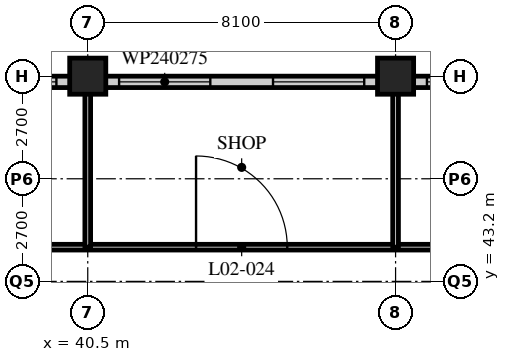
"""IFC4 building model, lengths in metres.
Left out: names, types, materials, properties, quantities, classifications, styles, units other than length and angle.
Written with IfcOpenShell. Run it as: python <this file> out.ifc"""

import sys

from ifc_helpers import new_model, si_unit, direction, frame, frame_2d, origin, origin_2d, place, context, subcontext, project, spatial, rectangle, hollow_rectangle, extrude, element, fill, save


model = new_model("IFC4")
c1 = context("Model", 3, precision=1e-05, world=origin(), true_north=direction((0.0, 1.0)))
c2 = subcontext(c1, "Body", "Model", "MODEL_VIEW")
j1 = project(units=[si_unit("LENGTHUNIT", "METRE"), si_unit("PLANEANGLEUNIT", "RADIAN")], contexts=[c1])
p1 = place(None, origin())
s1 = spatial("IfcSite", under=j1, at=p1, CompositionType="ELEMENT")
p2 = place(p1, origin())
s2 = spatial("IfcBuilding", under=s1, at=p2, CompositionType="ELEMENT")
p3 = place(p2, frame((0.0, 0.0, 11.4)))
s3 = spatial("IfcBuildingStorey", under=s2, at=p3, CompositionType="ELEMENT", Elevation=11.4)
for number, where, z_axis, x_axis in (
    (1, (40.5, 48.6, 0.0), (0.0, 0.0, 1.0), (1.0, 0.0, 0.0)),
    (2, (48.6, 48.6, 0.0), (0.0, 0.0, 1.0), (1.0, 0.0, 0.0)),
):
    element("IfcColumn", number, at=place(p3, frame(where, z_axis=z_axis, x_axis=x_axis)), inside=s3, PredefinedType="COLUMN", context=c2, shape_type="SweptSolid", body=[
        extrude(hollow_rectangle(XDim=0.95, YDim=0.95, WallThickness=0.1, at=origin_2d()), origin(), (0.0, 0.0, 1.0), 5.4),
    ])
p4 = place(p3, frame((64.5, 48.45, 0.0), z_axis=(0.0, 0.0, 1.0), x_axis=(-1.0, 0.0, 0.0)))
e3 = element("IfcWall", 3, at=p4, inside=s3, PredefinedType="SOLIDWALL", context=c2, shape_type="SweptSolid", body=[
    extrude(rectangle(XDim=72.6, YDim=0.3, at=frame_2d((36.3, 0.0))), origin(), (0.0, 0.0, 1.0), 5.15),
])
p5 = place(p4, frame((0.525, 0.0, 1.0)))
e4 = element("IfcOpeningElement", 4, at=p5, cuts=e3, PredefinedType="OPENING", context=c2, shape_type="SweptSolid", body=[
    extrude(rectangle(XDim=2.4, YDim=2.75, at=frame_2d((1.2, 1.375))), frame((0.0, 0.16, 0.0), z_axis=(0.0, -1.0, 0.0), x_axis=(1.0, 0.0, 0.0)), (0.0, 0.0, 1.0), 0.32),
])
p6 = place(p4, frame((4.575, 0.0, 1.0)))
e5 = element("IfcOpeningElement", 5, at=p6, cuts=e3, PredefinedType="OPENING", context=c2, shape_type="SweptSolid", body=[
    extrude(rectangle(XDim=2.4, YDim=2.75, at=frame_2d((1.2, 1.375))), frame((0.0, 0.16, 0.0), z_axis=(0.0, -1.0, 0.0), x_axis=(1.0, 0.0, 0.0)), (0.0, 0.0, 1.0), 0.32),
])
p7 = place(p4, frame((8.625, 0.0, 1.0)))
e6 = element("IfcOpeningElement", 6, at=p7, cuts=e3, PredefinedType="OPENING", context=c2, shape_type="SweptSolid", body=[
    extrude(rectangle(XDim=2.4, YDim=2.75, at=frame_2d((1.2, 1.375))), frame((0.0, 0.16, 0.0), z_axis=(0.0, -1.0, 0.0), x_axis=(1.0, 0.0, 0.0)), (0.0, 0.0, 1.0), 0.32),
])
p8 = place(p4, frame((12.675, 0.0, 1.0)))
e7 = element("IfcOpeningElement", 7, at=p8, cuts=e3, PredefinedType="OPENING", context=c2, shape_type="SweptSolid", body=[
    extrude(rectangle(XDim=2.4, YDim=2.75, at=frame_2d((1.2, 1.375))), frame((0.0, 0.16, 0.0), z_axis=(0.0, -1.0, 0.0), x_axis=(1.0, 0.0, 0.0)), (0.0, 0.0, 1.0), 0.32),
])
p9 = place(p4, frame((16.725, 0.0, 1.0)))
e8 = element("IfcOpeningElement", 8, at=p9, cuts=e3, PredefinedType="OPENING", context=c2, shape_type="SweptSolid", body=[
    extrude(rectangle(XDim=2.4, YDim=2.75, at=frame_2d((1.2, 1.375))), frame((0.0, 0.16, 0.0), z_axis=(0.0, -1.0, 0.0), x_axis=(1.0, 0.0, 0.0)), (0.0, 0.0, 1.0), 0.32),
])
p10 = place(p4, frame((20.775, 0.0, 1.0)))
e9 = element("IfcOpeningElement", 9, at=p10, cuts=e3, PredefinedType="OPENING", context=c2, shape_type="SweptSolid", body=[
    extrude(rectangle(XDim=2.4, YDim=2.75, at=frame_2d((1.2, 1.375))), frame((0.0, 0.16, 0.0), z_axis=(0.0, -1.0, 0.0), x_axis=(1.0, 0.0, 0.0)), (0.0, 0.0, 1.0), 0.32),
])
p11 = place(p4, frame((24.825, 0.0, 1.0)))
e10 = element("IfcOpeningElement", 10, at=p11, cuts=e3, PredefinedType="OPENING", context=c2, shape_type="SweptSolid", body=[
    extrude(rectangle(XDim=2.4, YDim=2.75, at=frame_2d((1.2, 1.375))), frame((0.0, 0.16, 0.0), z_axis=(0.0, -1.0, 0.0), x_axis=(1.0, 0.0, 0.0)), (0.0, 0.0, 1.0), 0.32),
])
p12 = place(p4, frame((28.875, 0.0, 1.0)))
e11 = element("IfcOpeningElement", 11, at=p12, cuts=e3, PredefinedType="OPENING", context=c2, shape_type="SweptSolid", body=[
    extrude(rectangle(XDim=2.4, YDim=2.75, at=frame_2d((1.2, 1.375))), frame((0.0, 0.16, 0.0), z_axis=(0.0, -1.0, 0.0), x_axis=(1.0, 0.0, 0.0)), (0.0, 0.0, 1.0), 0.32),
])
p13 = place(p4, frame((32.925, 0.0, 1.0)))
e12 = element("IfcOpeningElement", 12, at=p13, cuts=e3, PredefinedType="OPENING", context=c2, shape_type="SweptSolid", body=[
    extrude(rectangle(XDim=2.4, YDim=2.75, at=frame_2d((1.2, 1.375))), frame((0.0, 0.16, 0.0), z_axis=(0.0, -1.0, 0.0), x_axis=(1.0, 0.0, 0.0)), (0.0, 0.0, 1.0), 0.32),
])
p14 = place(p4, frame((36.975, 0.0, 1.0)))
e13 = element("IfcOpeningElement", 13, at=p14, cuts=e3, PredefinedType="OPENING", context=c2, shape_type="SweptSolid", body=[
    extrude(rectangle(XDim=2.4, YDim=2.75, at=frame_2d((1.2, 1.375))), frame((0.0, 0.16, 0.0), z_axis=(0.0, -1.0, 0.0), x_axis=(1.0, 0.0, 0.0)), (0.0, 0.0, 1.0), 0.32),
])
p15 = place(p4, frame((41.025, 0.0, 1.0)))
e14 = element("IfcOpeningElement", 14, at=p15, cuts=e3, PredefinedType="OPENING", context=c2, shape_type="SweptSolid", body=[
    extrude(rectangle(XDim=2.4, YDim=2.75, at=frame_2d((1.2, 1.375))), frame((0.0, 0.16, 0.0), z_axis=(0.0, -1.0, 0.0), x_axis=(1.0, 0.0, 0.0)), (0.0, 0.0, 1.0), 0.32),
])
p16 = place(p4, frame((45.075, 0.0, 1.0)))
e15 = element("IfcOpeningElement", 15, at=p16, cuts=e3, PredefinedType="OPENING", context=c2, shape_type="SweptSolid", body=[
    extrude(rectangle(XDim=2.4, YDim=2.75, at=frame_2d((1.2, 1.375))), frame((0.0, 0.16, 0.0), z_axis=(0.0, -1.0, 0.0), x_axis=(1.0, 0.0, 0.0)), (0.0, 0.0, 1.0), 0.32),
])
p17 = place(p4, frame((49.125, 0.0, 1.0)))
e16 = element("IfcOpeningElement", 16, at=p17, cuts=e3, PredefinedType="OPENING", context=c2, shape_type="SweptSolid", body=[
    extrude(rectangle(XDim=2.4, YDim=2.75, at=frame_2d((1.2, 1.375))), frame((0.0, 0.16, 0.0), z_axis=(0.0, -1.0, 0.0), x_axis=(1.0, 0.0, 0.0)), (0.0, 0.0, 1.0), 0.32),
])
p18 = place(p4, frame((53.175, 0.0, 1.0)))
e17 = element("IfcOpeningElement", 17, at=p18, cuts=e3, PredefinedType="OPENING", context=c2, shape_type="SweptSolid", body=[
    extrude(rectangle(XDim=2.4, YDim=2.75, at=frame_2d((1.2, 1.375))), frame((0.0, 0.16, 0.0), z_axis=(0.0, -1.0, 0.0), x_axis=(1.0, 0.0, 0.0)), (0.0, 0.0, 1.0), 0.32),
])
p19 = place(p4, frame((57.225, 0.0, 1.0)))
e18 = element("IfcOpeningElement", 18, at=p19, cuts=e3, PredefinedType="OPENING", context=c2, shape_type="SweptSolid", body=[
    extrude(rectangle(XDim=2.4, YDim=2.75, at=frame_2d((1.2, 1.375))), frame((0.0, 0.16, 0.0), z_axis=(0.0, -1.0, 0.0), x_axis=(1.0, 0.0, 0.0)), (0.0, 0.0, 1.0), 0.32),
])
p20 = place(p4, frame((61.275, 0.0, 1.0)))
e19 = element("IfcOpeningElement", 19, at=p20, cuts=e3, PredefinedType="OPENING", context=c2, shape_type="SweptSolid", body=[
    extrude(rectangle(XDim=2.4, YDim=2.75, at=frame_2d((1.2, 1.375))), frame((0.0, 0.16, 0.0), z_axis=(0.0, -1.0, 0.0), x_axis=(1.0, 0.0, 0.0)), (0.0, 0.0, 1.0), 0.32),
])
p21 = place(p4, frame((65.325, 0.0, 1.0)))
e20 = element("IfcOpeningElement", 20, at=p21, cuts=e3, PredefinedType="OPENING", context=c2, shape_type="SweptSolid", body=[
    extrude(rectangle(XDim=2.4, YDim=2.75, at=frame_2d((1.2, 1.375))), frame((0.0, 0.16, 0.0), z_axis=(0.0, -1.0, 0.0), x_axis=(1.0, 0.0, 0.0)), (0.0, 0.0, 1.0), 0.32),
])
p22 = place(p4, frame((69.375, 0.0, 1.0)))
e21 = element("IfcOpeningElement", 21, at=p22, cuts=e3, PredefinedType="OPENING", context=c2, shape_type="SweptSolid", body=[
    extrude(rectangle(XDim=2.4, YDim=2.75, at=frame_2d((1.2, 1.375))), frame((0.0, 0.16, 0.0), z_axis=(0.0, -1.0, 0.0), x_axis=(1.0, 0.0, 0.0)), (0.0, 0.0, 1.0), 0.32),
])
p23 = place(p3, frame((0.0, 44.1, 0.0), z_axis=(0.0, 0.0, 1.0), x_axis=(1.0, 0.0, 0.0)))
e22 = element("IfcWall", 22, at=p23, inside=s3, PredefinedType="PARTITIONING", context=c2, shape_type="SweptSolid", body=[
    extrude(rectangle(XDim=56.7, YDim=0.15, at=frame_2d((28.35, 0.0))), origin(), (0.0, 0.0, 1.0), 5.15),
])
p24 = place(p23, frame((10.95, 0.0, 0.0)))
e23 = element("IfcOpeningElement", 23, at=p24, cuts=e22, PredefinedType="OPENING", context=c2, shape_type="SweptSolid", body=[
    extrude(rectangle(XDim=2.4, YDim=2.7, at=frame_2d((1.2, 1.35))), frame((0.0, 0.085, 0.0), z_axis=(0.0, -1.0, 0.0), x_axis=(1.0, 0.0, 0.0)), (0.0, 0.0, 1.0), 0.17),
])
p25 = place(p23, frame((19.05, 0.0, 0.0)))
e24 = element("IfcOpeningElement", 24, at=p25, cuts=e22, PredefinedType="OPENING", context=c2, shape_type="SweptSolid", body=[
    extrude(rectangle(XDim=2.4, YDim=2.7, at=frame_2d((1.2, 1.35))), frame((0.0, 0.085, 0.0), z_axis=(0.0, -1.0, 0.0), x_axis=(1.0, 0.0, 0.0)), (0.0, 0.0, 1.0), 0.17),
])
p26 = place(p23, frame((27.15, 0.0, 0.0)))
e25 = element("IfcOpeningElement", 25, at=p26, cuts=e22, PredefinedType="OPENING", context=c2, shape_type="SweptSolid", body=[
    extrude(rectangle(XDim=2.4, YDim=2.7, at=frame_2d((1.2, 1.35))), frame((0.0, 0.085, 0.0), z_axis=(0.0, -1.0, 0.0), x_axis=(1.0, 0.0, 0.0)), (0.0, 0.0, 1.0), 0.17),
])
p27 = place(p23, frame((35.25, 0.0, 0.0)))
e26 = element("IfcOpeningElement", 26, at=p27, cuts=e22, PredefinedType="OPENING", context=c2, shape_type="SweptSolid", body=[
    extrude(rectangle(XDim=2.4, YDim=2.7, at=frame_2d((1.2, 1.35))), frame((0.0, 0.085, 0.0), z_axis=(0.0, -1.0, 0.0), x_axis=(1.0, 0.0, 0.0)), (0.0, 0.0, 1.0), 0.17),
])
p28 = place(p23, frame((43.35, 0.0, 0.0)))
e27 = element("IfcOpeningElement", 27, at=p28, cuts=e22, PredefinedType="OPENING", context=c2, shape_type="SweptSolid", body=[
    extrude(rectangle(XDim=2.4, YDim=2.7, at=frame_2d((1.2, 1.35))), frame((0.0, 0.085, 0.0), z_axis=(0.0, -1.0, 0.0), x_axis=(1.0, 0.0, 0.0)), (0.0, 0.0, 1.0), 0.17),
])
p29 = place(p23, frame((53.45, 0.0, 0.0)))
e28 = element("IfcOpeningElement", 28, at=p29, cuts=e22, PredefinedType="OPENING", context=c2, shape_type="SweptSolid", body=[
    extrude(rectangle(XDim=2.4, YDim=2.7, at=frame_2d((1.2, 1.35))), frame((0.0, 0.085, 0.0), z_axis=(0.0, -1.0, 0.0), x_axis=(1.0, 0.0, 0.0)), (0.0, 0.0, 1.0), 0.17),
])
p30 = place(p23, frame((4.85, 0.0, 0.0)))
e29 = element("IfcOpeningElement", 29, at=p30, cuts=e22, PredefinedType="OPENING", context=c2, shape_type="SweptSolid", body=[
    extrude(rectangle(XDim=2.4, YDim=2.7, at=frame_2d((1.2, 1.35))), frame((0.0, 0.085, 0.0), z_axis=(0.0, -1.0, 0.0), x_axis=(1.0, 0.0, 0.0)), (0.0, 0.0, 1.0), 0.17),
])
for number, where, z_axis, x_axis in (
    (30, (40.5, 44.1, 0.0), (0.0, 0.0, 1.0), (0.0, 1.0, 0.0)),
    (31, (48.6, 44.1, 0.0), (0.0, 0.0, 1.0), (0.0, 1.0, 0.0)),
):
    element("IfcWall", number, at=place(p3, frame(where, z_axis=z_axis, x_axis=x_axis)), inside=s3, PredefinedType="PARTITIONING", context=c2, shape_type="SweptSolid", body=[
        extrude(rectangle(XDim=4.2, YDim=0.15, at=frame_2d((2.1, 0.0))), origin(), (0.0, 0.0, 1.0), 4.538),
    ])
p31 = place(p8, origin())
e32 = element("IfcWindow", 32, at=p31, inside=s3, PartitioningType="SINGLE_PANEL", PredefinedType="WINDOW", context=c2, shape_type="SweptSolid", body=[
    extrude(rectangle(XDim=2.4, YDim=2.75, at=frame_2d((1.2, 1.375))), frame((0.0, 0.03, 0.0), z_axis=(0.0, -1.0, 0.0), x_axis=(1.0, 0.0, 0.0)), (0.0, 0.0, 1.0), 0.06),
])
fill(e7, e32)
p32 = place(p9, origin())
e33 = element("IfcWindow", 33, at=p32, inside=s3, PartitioningType="SINGLE_PANEL", PredefinedType="WINDOW", context=c2, shape_type="SweptSolid", body=[
    extrude(rectangle(XDim=2.4, YDim=2.75, at=frame_2d((1.2, 1.375))), frame((0.0, 0.03, 0.0), z_axis=(0.0, -1.0, 0.0), x_axis=(1.0, 0.0, 0.0)), (0.0, 0.0, 1.0), 0.06),
])
fill(e8, e33)
p33 = place(p10, origin())
e34 = element("IfcWindow", 34, at=p33, inside=s3, PartitioningType="SINGLE_PANEL", PredefinedType="WINDOW", context=c2, shape_type="SweptSolid", body=[
    extrude(rectangle(XDim=2.4, YDim=2.75, at=frame_2d((1.2, 1.375))), frame((0.0, 0.03, 0.0), z_axis=(0.0, -1.0, 0.0), x_axis=(1.0, 0.0, 0.0)), (0.0, 0.0, 1.0), 0.06),
])
fill(e9, e34)
p34 = place(p11, origin())
e35 = element("IfcWindow", 35, at=p34, inside=s3, PartitioningType="SINGLE_PANEL", PredefinedType="WINDOW", context=c2, shape_type="SweptSolid", body=[
    extrude(rectangle(XDim=2.4, YDim=2.75, at=frame_2d((1.2, 1.375))), frame((0.0, 0.03, 0.0), z_axis=(0.0, -1.0, 0.0), x_axis=(1.0, 0.0, 0.0)), (0.0, 0.0, 1.0), 0.06),
])
fill(e10, e35)
p35 = place(p28, origin())
e36 = element("IfcDoor", 36, at=p35, inside=s3, OperationType="DOUBLE_DOOR_SINGLE_SWING", PredefinedType="DOOR", context=c2, shape_type="SweptSolid", body=[
    extrude(rectangle(XDim=2.4, YDim=2.7, at=frame_2d((1.2, 1.35))), frame((0.0, 0.025, 0.0), z_axis=(0.0, -1.0, 0.0), x_axis=(1.0, 0.0, 0.0)), (0.0, 0.0, 1.0), 0.05),
])
fill(e27, e36)
save(model, sys.argv[1])
